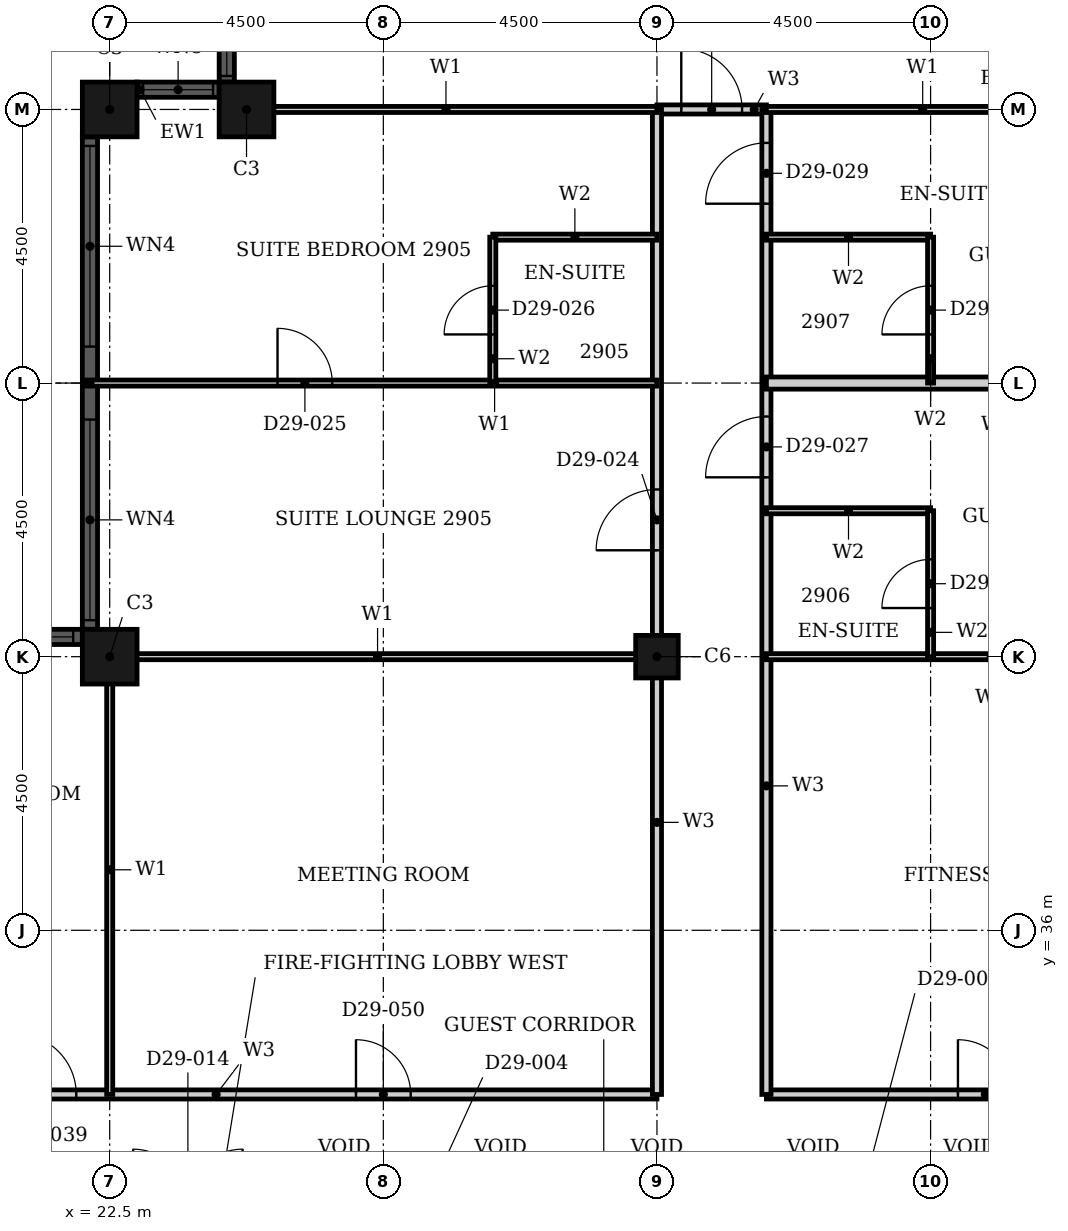
"""IFC4 building model, lengths in metres.
Left out: names, types, materials, properties, quantities, classifications, styles, units other than length and angle.
Written with IfcOpenShell. Run it as: python <this file> out.ifc"""

import sys

from ifc_helpers import new_model, si_unit, direction, frame, frame_2d, origin, origin_2d, place, context, subcontext, project, spatial, rectangle, hollow_rectangle, extrude, element, fill, save


model = new_model("IFC4")
c1 = context("Model", 3, precision=1e-05, world=origin(), true_north=direction((0.0, 1.0)))
c2 = subcontext(c1, "Body", "Model", "MODEL_VIEW")
j1 = project(units=[si_unit("LENGTHUNIT", "METRE"), si_unit("PLANEANGLEUNIT", "RADIAN")], contexts=[c1])
p1 = place(None, origin())
s1 = spatial("IfcSite", under=j1, at=p1, CompositionType="ELEMENT")
p2 = place(p1, origin())
s2 = spatial("IfcBuilding", under=s1, at=p2, CompositionType="ELEMENT")
p3 = place(p2, frame((0.0, 0.0, 118.8)))
s3 = spatial("IfcBuildingStorey", under=s2, at=p3, CompositionType="ELEMENT", Elevation=118.8)
for number, where, z_axis, x_axis in (
    (1, (24.75, 49.5, 0.0), (0.0, 0.0, 1.0), (1.0, 0.0, 0.0)),
    (2, (22.5, 49.5, 0.0), (0.0, 0.0, 1.0), (1.0, 0.0, 0.0)),
    (3, (22.5, 40.5, 0.0), (0.0, 0.0, 1.0), (1.0, 0.0, 0.0)),
):
    element("IfcColumn", number, at=place(p3, frame(where, z_axis=z_axis, x_axis=x_axis)), inside=s3, PredefinedType="COLUMN", context=c2, shape_type="SweptSolid", body=[
        extrude(hollow_rectangle(XDim=0.9, YDim=0.9, WallThickness=0.028, at=origin_2d()), origin(), (0.0, 0.0, 1.0), 3.6),
    ])
p4 = place(p3, frame((31.5, 40.5, 0.0), z_axis=(0.0, 0.0, 1.0), x_axis=(1.0, 0.0, 0.0)))
e4 = element("IfcColumn", 4, at=p4, inside=s3, PredefinedType="COLUMN", context=c2, shape_type="SweptSolid", body=[
    extrude(hollow_rectangle(XDim=0.7, YDim=0.7, WallThickness=0.022, at=origin_2d()), origin(), (0.0, 0.0, 1.0), 3.6),
])
p5 = place(p3, frame((24.425, 51.3, 0.0), z_axis=(0.0, 0.0, 1.0), x_axis=(0.0, -1.0, 0.0)))
e5 = element("IfcWall", 5, at=p5, inside=s3, PredefinedType="SOLIDWALL", context=c2, shape_type="SweptSolid", body=[
    extrude(rectangle(XDim=1.35, YDim=0.25, at=frame_2d((0.675, 0.0))), origin(), (0.0, 0.0, 1.0), 3.6),
])
p6 = place(p5, frame((0.1, 0.0, 0.9)))
e6 = element("IfcOpeningElement", 6, at=p6, cuts=e5, PredefinedType="OPENING", context=c2, shape_type="SweptSolid", body=[
    extrude(rectangle(XDim=1.15, YDim=2.08, at=frame_2d((0.575, 1.04))), frame((0.0, 0.135, 0.0), z_axis=(0.0, -1.0, 0.0), x_axis=(1.0, 0.0, 0.0)), (0.0, 0.0, 1.0), 0.27),
])
p7 = place(p3, frame((24.3, 49.825, 0.0), z_axis=(0.0, 0.0, 1.0), x_axis=(-1.0, 0.0, 0.0)))
e7 = element("IfcWall", 7, at=p7, inside=s3, PredefinedType="SOLIDWALL", context=c2, shape_type="SweptSolid", body=[
    extrude(rectangle(XDim=1.35, YDim=0.25, at=frame_2d((0.675, 0.0))), origin(), (0.0, 0.0, 1.0), 3.6),
])
p8 = place(p7, frame((0.1, 0.0, 0.9)))
e8 = element("IfcOpeningElement", 8, at=p8, cuts=e7, PredefinedType="OPENING", context=c2, shape_type="SweptSolid", body=[
    extrude(rectangle(XDim=1.15, YDim=2.08, at=frame_2d((0.575, 1.04))), frame((0.0, 0.135, 0.0), z_axis=(0.0, -1.0, 0.0), x_axis=(1.0, 0.0, 0.0)), (0.0, 0.0, 1.0), 0.27),
])
p9 = place(p3, frame((22.175, 49.05, 0.0), z_axis=(0.0, 0.0, 1.0), x_axis=(0.0, -1.0, 0.0)))
e9 = element("IfcWall", 9, at=p9, inside=s3, PredefinedType="SOLIDWALL", context=c2, shape_type="SweptSolid", body=[
    extrude(rectangle(XDim=8.1, YDim=0.25, at=frame_2d((4.05, 0.0))), origin(), (0.0, 0.0, 1.0), 3.6),
])
p10 = place(p9, frame((0.15, 0.0, 0.9)))
e10 = element("IfcOpeningElement", 10, at=p10, cuts=e9, PredefinedType="OPENING", context=c2, shape_type="SweptSolid", body=[
    extrude(rectangle(XDim=3.3, YDim=2.08, at=frame_2d((1.65, 1.04))), frame((0.0, 0.135, 0.0), z_axis=(0.0, -1.0, 0.0), x_axis=(1.0, 0.0, 0.0)), (0.0, 0.0, 1.0), 0.27),
])
p11 = place(p9, frame((4.65, 0.0, 0.9)))
e11 = element("IfcOpeningElement", 11, at=p11, cuts=e9, PredefinedType="OPENING", context=c2, shape_type="SweptSolid", body=[
    extrude(rectangle(XDim=3.3, YDim=2.08, at=frame_2d((1.65, 1.04))), frame((0.0, 0.135, 0.0), z_axis=(0.0, -1.0, 0.0), x_axis=(1.0, 0.0, 0.0)), (0.0, 0.0, 1.0), 0.27),
])
p12 = place(p3, frame((22.05, 40.825, 0.0), z_axis=(0.0, 0.0, 1.0), x_axis=(-1.0, 0.0, 0.0)))
e12 = element("IfcWall", 12, at=p12, inside=s3, PredefinedType="SOLIDWALL", context=c2, shape_type="SweptSolid", body=[
    extrude(rectangle(XDim=3.6, YDim=0.25, at=frame_2d((1.8, 0.0))), origin(), (0.0, 0.0, 1.0), 3.6),
])
p13 = place(p12, frame((0.15, 0.0, 0.9)))
e13 = element("IfcOpeningElement", 13, at=p13, cuts=e12, PredefinedType="OPENING", context=c2, shape_type="SweptSolid", body=[
    extrude(rectangle(XDim=3.3, YDim=2.08, at=frame_2d((1.65, 1.04))), frame((0.0, 0.135, 0.0), z_axis=(0.0, -1.0, 0.0), x_axis=(1.0, 0.0, 0.0)), (0.0, 0.0, 1.0), 0.27),
])
p14 = place(p3, frame((33.3, 33.3, 0.0), z_axis=(0.0, 0.0, 1.0), x_axis=(1.0, 0.0, 0.0)))
e14 = element("IfcWall", 14, at=p14, inside=s3, PredefinedType="PARTITIONING", context=c2, shape_type="SweptSolid", body=[
    extrude(rectangle(XDim=11.7, YDim=0.15, at=frame_2d((5.85, 0.0))), origin(), (0.0, 0.0, 1.0), 3.3),
])
p15 = place(p14, frame((10.15, 0.0, 0.0)))
e15 = element("IfcOpeningElement", 15, at=p15, cuts=e14, PredefinedType="OPENING", context=c2, shape_type="SweptSolid", body=[
    extrude(rectangle(XDim=1.0, YDim=2.1, at=frame_2d((0.5, 1.05))), frame((0.0, 0.085, 0.0), z_axis=(0.0, -1.0, 0.0), x_axis=(1.0, 0.0, 0.0)), (0.0, 0.0, 1.0), 0.17),
])
p16 = place(p14, frame((3.15, 0.0, 0.0)))
e16 = element("IfcOpeningElement", 16, at=p16, cuts=e14, PredefinedType="OPENING", context=c2, shape_type="SweptSolid", body=[
    extrude(rectangle(XDim=0.9, YDim=2.1, at=frame_2d((0.45, 1.05))), frame((0.0, 0.085, 0.0), z_axis=(0.0, -1.0, 0.0), x_axis=(1.0, 0.0, 0.0)), (0.0, 0.0, 1.0), 0.17),
])
p17 = place(p3, frame((16.2, 33.3, 0.0), z_axis=(0.0, 0.0, 1.0), x_axis=(1.0, 0.0, 0.0)))
e17 = element("IfcWall", 17, at=p17, inside=s3, PredefinedType="PARTITIONING", context=c2, shape_type="SweptSolid", body=[
    extrude(rectangle(XDim=15.3, YDim=0.15, at=frame_2d((7.65, 0.0))), origin(), (0.0, 0.0, 1.0), 3.3),
])
p18 = place(p17, frame((4.75, 0.0, 0.0)))
e18 = element("IfcOpeningElement", 18, at=p18, cuts=e17, PredefinedType="OPENING", context=c2, shape_type="SweptSolid", body=[
    extrude(rectangle(XDim=1.0, YDim=2.1, at=frame_2d((0.5, 1.05))), frame((0.0, 0.085, 0.0), z_axis=(0.0, -1.0, 0.0), x_axis=(1.0, 0.0, 0.0)), (0.0, 0.0, 1.0), 0.17),
])
p19 = place(p17, frame((0.45, 0.0, 0.0)))
e19 = element("IfcOpeningElement", 19, at=p19, cuts=e17, PredefinedType="OPENING", context=c2, shape_type="SweptSolid", body=[
    extrude(rectangle(XDim=0.9, YDim=2.1, at=frame_2d((0.45, 1.05))), frame((0.0, 0.085, 0.0), z_axis=(0.0, -1.0, 0.0), x_axis=(1.0, 0.0, 0.0)), (0.0, 0.0, 1.0), 0.17),
])
p20 = place(p17, frame((10.35, 0.0, 0.0)))
e20 = element("IfcOpeningElement", 20, at=p20, cuts=e17, PredefinedType="OPENING", context=c2, shape_type="SweptSolid", body=[
    extrude(rectangle(XDim=0.9, YDim=2.1, at=frame_2d((0.45, 1.05))), frame((0.0, 0.085, 0.0), z_axis=(0.0, -1.0, 0.0), x_axis=(1.0, 0.0, 0.0)), (0.0, 0.0, 1.0), 0.17),
])
p21 = place(p3, frame((31.5, 49.5, 0.0), z_axis=(0.0, 0.0, 1.0), x_axis=(1.0, 0.0, 0.0)))
e21 = element("IfcWall", 21, at=p21, inside=s3, PredefinedType="PARTITIONING", context=c2, shape_type="SweptSolid", body=[
    extrude(rectangle(XDim=1.8, YDim=0.15, at=frame_2d((0.9, 0.0))), origin(), (0.0, 0.0, 1.0), 3.3),
])
p22 = place(p21, frame((0.4, 0.0, 0.0)))
e22 = element("IfcOpeningElement", 22, at=p22, cuts=e21, PredefinedType="OPENING", context=c2, shape_type="SweptSolid", body=[
    extrude(rectangle(XDim=1.0, YDim=2.1, at=frame_2d((0.5, 1.05))), frame((0.0, 0.085, 0.0), z_axis=(0.0, -1.0, 0.0), x_axis=(1.0, 0.0, 0.0)), (0.0, 0.0, 1.0), 0.17),
])
p23 = place(p3, frame((31.5, 33.3, 0.0), z_axis=(0.0, 0.0, 1.0), x_axis=(0.0, 1.0, 0.0)))
e23 = element("IfcWall", 23, at=p23, inside=s3, PredefinedType="PARTITIONING", context=c2, shape_type="SweptSolid", body=[
    extrude(rectangle(XDim=16.2, YDim=0.15, at=frame_2d((8.1, 0.0))), origin(), (0.0, 0.0, 1.0), 2.58),
])
p24 = place(p23, frame((8.95, 0.0, 0.0)))
e24 = element("IfcOpeningElement", 24, at=p24, cuts=e23, PredefinedType="OPENING", context=c2, shape_type="SweptSolid", body=[
    extrude(rectangle(XDim=1.0, YDim=2.1, at=frame_2d((0.5, 1.05))), frame((0.0, 0.085, 0.0), z_axis=(0.0, -1.0, 0.0), x_axis=(1.0, 0.0, 0.0)), (0.0, 0.0, 1.0), 0.17),
])
p25 = place(p3, frame((33.3, 33.3, 0.0), z_axis=(0.0, 0.0, 1.0), x_axis=(0.0, 1.0, 0.0)))
e25 = element("IfcWall", 25, at=p25, inside=s3, PredefinedType="PARTITIONING", context=c2, shape_type="SweptSolid", body=[
    extrude(rectangle(XDim=16.2, YDim=0.15, at=frame_2d((8.1, 0.0))), origin(), (0.0, 0.0, 1.0), 3.3),
])
p26 = place(p25, frame((10.15, 0.0, 0.0)))
e26 = element("IfcOpeningElement", 26, at=p26, cuts=e25, PredefinedType="OPENING", context=c2, shape_type="SweptSolid", body=[
    extrude(rectangle(XDim=1.0, YDim=2.1, at=frame_2d((0.5, 1.05))), frame((0.0, 0.085, 0.0), z_axis=(0.0, -1.0, 0.0), x_axis=(1.0, 0.0, 0.0)), (0.0, 0.0, 1.0), 0.17),
])
p27 = place(p25, frame((14.65, 0.0, 0.0)))
e27 = element("IfcOpeningElement", 27, at=p27, cuts=e25, PredefinedType="OPENING", context=c2, shape_type="SweptSolid", body=[
    extrude(rectangle(XDim=1.0, YDim=2.1, at=frame_2d((0.5, 1.05))), frame((0.0, 0.085, 0.0), z_axis=(0.0, -1.0, 0.0), x_axis=(1.0, 0.0, 0.0)), (0.0, 0.0, 1.0), 0.17),
])
p28 = place(p3, frame((33.3, 40.5, 0.0), z_axis=(0.0, 0.0, 1.0), x_axis=(1.0, 0.0, 0.0)))
e28 = element("IfcWall", 28, at=p28, inside=s3, PredefinedType="PARTITIONING", context=c2, shape_type="SweptSolid", body=[
    extrude(rectangle(XDim=7.39, YDim=0.1, at=frame_2d((3.695, 0.0))), origin(), (0.0, 0.0, 1.0), 2.38),
])
p29 = place(p3, frame((22.31, 40.5, 0.0), z_axis=(0.0, 0.0, 1.0), x_axis=(1.0, 0.0, 0.0)))
e29 = element("IfcWall", 29, at=p29, inside=s3, PredefinedType="PARTITIONING", context=c2, shape_type="SweptSolid", body=[
    extrude(rectangle(XDim=9.19, YDim=0.1, at=frame_2d((4.595, 0.0))), origin(), (0.0, 0.0, 1.0), 2.38),
])
p30 = place(p3, frame((22.11, 45.0, 0.0), z_axis=(0.0, 0.0, 1.0), x_axis=(1.0, 0.0, 0.0)))
e30 = element("IfcWall", 30, at=p30, inside=s3, PredefinedType="PARTITIONING", context=c2, shape_type="SweptSolid", body=[
    extrude(rectangle(XDim=9.39, YDim=0.1, at=frame_2d((4.695, 0.0))), origin(), (0.0, 0.0, 1.0), 3.3),
])
p31 = place(p30, frame((3.15, 0.0, 0.0)))
e31 = element("IfcOpeningElement", 31, at=p31, cuts=e30, PredefinedType="OPENING", context=c2, shape_type="SweptSolid", body=[
    extrude(rectangle(XDim=0.9, YDim=2.1, at=frame_2d((0.45, 1.05))), frame((0.0, 0.06, 0.0), z_axis=(0.0, -1.0, 0.0), x_axis=(1.0, 0.0, 0.0)), (0.0, 0.0, 1.0), 0.12),
])
p32 = place(p3, frame((33.3, 49.5, 0.0), z_axis=(0.0, 0.0, 1.0), x_axis=(1.0, 0.0, 0.0)))
e32 = element("IfcWall", 32, at=p32, inside=s3, PredefinedType="PARTITIONING", context=c2, shape_type="SweptSolid", body=[
    extrude(rectangle(XDim=5.14, YDim=0.1, at=frame_2d((2.57, 0.0))), origin(), (0.0, 0.0, 1.0), 3.3),
])
p33 = place(p3, frame((24.56, 49.5, 0.0), z_axis=(0.0, 0.0, 1.0), x_axis=(1.0, 0.0, 0.0)))
e33 = element("IfcWall", 33, at=p33, inside=s3, PredefinedType="PARTITIONING", context=c2, shape_type="SweptSolid", body=[
    extrude(rectangle(XDim=6.94, YDim=0.1, at=frame_2d((3.47, 0.0))), origin(), (0.0, 0.0, 1.0), 3.3),
])
p34 = place(p3, frame((22.5, 33.3, 0.0), z_axis=(0.0, 0.0, 1.0), x_axis=(0.0, 1.0, 0.0)))
e34 = element("IfcWall", 34, at=p34, inside=s3, PredefinedType="PARTITIONING", context=c2, shape_type="SweptSolid", body=[
    extrude(rectangle(XDim=7.39, YDim=0.1, at=frame_2d((3.695, 0.0))), origin(), (0.0, 0.0, 1.0), 3.3),
])
p35 = place(p3, frame((33.3, 45.0, 0.0), z_axis=(0.0, 0.0, 1.0), x_axis=(1.0, 0.0, 0.0)))
e35 = element("IfcWall", 35, at=p35, inside=s3, PredefinedType="PARTITIONING", context=c2, shape_type="SweptSolid", body=[
    extrude(rectangle(XDim=7.59, YDim=0.2, at=frame_2d((3.795, 0.0))), origin(), (0.0, 0.0, 1.0), 3.3),
])
for number, where, z_axis, x_axis in (
    (36, (33.3, 42.9, 0.0), (0.0, 0.0, 1.0), (1.0, 0.0, 0.0)),
    (37, (33.3, 47.4, 0.0), (0.0, 0.0, 1.0), (1.0, 0.0, 0.0)),
    (38, (28.8, 47.4, 0.0), (0.0, 0.0, 1.0), (1.0, 0.0, 0.0)),
):
    element("IfcWall", number, at=place(p3, frame(where, z_axis=z_axis, x_axis=x_axis)), inside=s3, PredefinedType="PARTITIONING", context=c2, shape_type="SweptSolid", body=[
        extrude(rectangle(XDim=2.7, YDim=0.1, at=frame_2d((1.35, 0.0))), origin(), (0.0, 0.0, 1.0), 3.3),
    ])
p36 = place(p3, frame((28.8, 45.0, 0.0), z_axis=(0.0, 0.0, 1.0), x_axis=(0.0, 1.0, 0.0)))
e39 = element("IfcWall", 39, at=p36, inside=s3, PredefinedType="PARTITIONING", context=c2, shape_type="SweptSolid", body=[
    extrude(rectangle(XDim=2.4, YDim=0.1, at=frame_2d((1.2, 0.0))), origin(), (0.0, 0.0, 1.0), 3.3),
])
p37 = place(p36, frame((0.8, 0.0, 0.0)))
e40 = element("IfcOpeningElement", 40, at=p37, cuts=e39, PredefinedType="OPENING", context=c2, shape_type="SweptSolid", body=[
    extrude(rectangle(XDim=0.8, YDim=2.1, at=frame_2d((0.4, 1.05))), frame((0.0, 0.06, 0.0), z_axis=(0.0, -1.0, 0.0), x_axis=(1.0, 0.0, 0.0)), (0.0, 0.0, 1.0), 0.12),
])
p38 = place(p3, frame((36.0, 40.5, 0.0), z_axis=(0.0, 0.0, 1.0), x_axis=(0.0, 1.0, 0.0)))
e41 = element("IfcWall", 41, at=p38, inside=s3, PredefinedType="PARTITIONING", context=c2, shape_type="SweptSolid", body=[
    extrude(rectangle(XDim=2.4, YDim=0.1, at=frame_2d((1.2, 0.0))), origin(), (0.0, 0.0, 1.0), 2.58),
])
p39 = place(p38, frame((0.8, 0.0, 0.0)))
e42 = element("IfcOpeningElement", 42, at=p39, cuts=e41, PredefinedType="OPENING", context=c2, shape_type="SweptSolid", body=[
    extrude(rectangle(XDim=0.8, YDim=2.1, at=frame_2d((0.4, 1.05))), frame((0.0, 0.06, 0.0), z_axis=(0.0, -1.0, 0.0), x_axis=(1.0, 0.0, 0.0)), (0.0, 0.0, 1.0), 0.12),
])
p40 = place(p3, frame((36.0, 45.0, 0.0), z_axis=(0.0, 0.0, 1.0), x_axis=(0.0, 1.0, 0.0)))
e43 = element("IfcWall", 43, at=p40, inside=s3, PredefinedType="PARTITIONING", context=c2, shape_type="SweptSolid", body=[
    extrude(rectangle(XDim=2.4, YDim=0.1, at=frame_2d((1.2, 0.0))), origin(), (0.0, 0.0, 1.0), 2.58),
])
p41 = place(p40, frame((0.8, 0.0, 0.0)))
e44 = element("IfcOpeningElement", 44, at=p41, cuts=e43, PredefinedType="OPENING", context=c2, shape_type="SweptSolid", body=[
    extrude(rectangle(XDim=0.8, YDim=2.1, at=frame_2d((0.4, 1.05))), frame((0.0, 0.06, 0.0), z_axis=(0.0, -1.0, 0.0), x_axis=(1.0, 0.0, 0.0)), (0.0, 0.0, 1.0), 0.12),
])
p42 = place(p6, origin())
e45 = element("IfcWindow", 45, at=p42, inside=s3, PartitioningType="SINGLE_PANEL", PredefinedType="WINDOW", context=c2, shape_type="SweptSolid", body=[
    extrude(rectangle(XDim=1.15, YDim=2.08, at=frame_2d((0.575, 1.04))), frame((0.0, 0.03, 0.0), z_axis=(0.0, -1.0, 0.0), x_axis=(1.0, 0.0, 0.0)), (0.0, 0.0, 1.0), 0.06),
])
fill(e6, e45)
p43 = place(p8, origin())
e46 = element("IfcWindow", 46, at=p43, inside=s3, PartitioningType="SINGLE_PANEL", PredefinedType="WINDOW", context=c2, shape_type="SweptSolid", body=[
    extrude(rectangle(XDim=1.15, YDim=2.08, at=frame_2d((0.575, 1.04))), frame((0.0, 0.03, 0.0), z_axis=(0.0, -1.0, 0.0), x_axis=(1.0, 0.0, 0.0)), (0.0, 0.0, 1.0), 0.06),
])
fill(e8, e46)
p44 = place(p10, origin())
e47 = element("IfcWindow", 47, at=p44, inside=s3, PartitioningType="SINGLE_PANEL", PredefinedType="WINDOW", context=c2, shape_type="SweptSolid", body=[
    extrude(rectangle(XDim=3.3, YDim=2.08, at=frame_2d((1.65, 1.04))), frame((0.0, 0.03, 0.0), z_axis=(0.0, -1.0, 0.0), x_axis=(1.0, 0.0, 0.0)), (0.0, 0.0, 1.0), 0.06),
])
fill(e10, e47)
p45 = place(p11, origin())
e48 = element("IfcWindow", 48, at=p45, inside=s3, PartitioningType="SINGLE_PANEL", PredefinedType="WINDOW", context=c2, shape_type="SweptSolid", body=[
    extrude(rectangle(XDim=3.3, YDim=2.08, at=frame_2d((1.65, 1.04))), frame((0.0, 0.03, 0.0), z_axis=(0.0, -1.0, 0.0), x_axis=(1.0, 0.0, 0.0)), (0.0, 0.0, 1.0), 0.06),
])
fill(e11, e48)
p46 = place(p13, origin())
e49 = element("IfcWindow", 49, at=p46, inside=s3, PartitioningType="SINGLE_PANEL", PredefinedType="WINDOW", context=c2, shape_type="SweptSolid", body=[
    extrude(rectangle(XDim=3.3, YDim=2.08, at=frame_2d((1.65, 1.04))), frame((0.0, 0.03, 0.0), z_axis=(0.0, -1.0, 0.0), x_axis=(1.0, 0.0, 0.0)), (0.0, 0.0, 1.0), 0.06),
])
fill(e13, e49)
p47 = place(p24, origin())
e50 = element("IfcDoor", 50, at=p47, inside=s3, OperationType="SINGLE_SWING_LEFT", PredefinedType="DOOR", context=c2, shape_type="SweptSolid", body=[
    extrude(rectangle(XDim=1.0, YDim=2.1, at=frame_2d((0.5, 1.05))), frame((0.0, 0.025, 0.0), z_axis=(0.0, -1.0, 0.0), x_axis=(1.0, 0.0, 0.0)), (0.0, 0.0, 1.0), 0.05),
])
fill(e24, e50)
p48 = place(p31, origin())
e51 = element("IfcDoor", 51, at=p48, inside=s3, OperationType="SINGLE_SWING_LEFT", PredefinedType="DOOR", context=c2, shape_type="SweptSolid", body=[
    extrude(rectangle(XDim=0.9, YDim=2.1, at=frame_2d((0.45, 1.05))), frame((0.0, 0.025, 0.0), z_axis=(0.0, -1.0, 0.0), x_axis=(1.0, 0.0, 0.0)), (0.0, 0.0, 1.0), 0.05),
])
fill(e31, e51)
p49 = place(p37, origin())
e52 = element("IfcDoor", 52, at=p49, inside=s3, OperationType="SINGLE_SWING_LEFT", PredefinedType="DOOR", context=c2, shape_type="SweptSolid", body=[
    extrude(rectangle(XDim=0.8, YDim=2.1, at=frame_2d((0.4, 1.05))), frame((0.0, 0.025, 0.0), z_axis=(0.0, -1.0, 0.0), x_axis=(1.0, 0.0, 0.0)), (0.0, 0.0, 1.0), 0.05),
])
fill(e40, e52)
p50 = place(p26, origin())
e53 = element("IfcDoor", 53, at=p50, inside=s3, OperationType="SINGLE_SWING_RIGHT", PredefinedType="DOOR", context=c2, shape_type="SweptSolid", body=[
    extrude(rectangle(XDim=1.0, YDim=2.1, at=frame_2d((0.5, 1.05))), frame((0.0, 0.025, 0.0), z_axis=(0.0, -1.0, 0.0), x_axis=(1.0, 0.0, 0.0)), (0.0, 0.0, 1.0), 0.05),
])
fill(e26, e53)
p51 = place(p39, origin())
e54 = element("IfcDoor", 54, at=p51, inside=s3, OperationType="SINGLE_SWING_LEFT", PredefinedType="DOOR", context=c2, shape_type="SweptSolid", body=[
    extrude(rectangle(XDim=0.8, YDim=2.1, at=frame_2d((0.4, 1.05))), frame((0.0, 0.025, 0.0), z_axis=(0.0, -1.0, 0.0), x_axis=(1.0, 0.0, 0.0)), (0.0, 0.0, 1.0), 0.05),
])
fill(e42, e54)
p52 = place(p27, origin())
e55 = element("IfcDoor", 55, at=p52, inside=s3, OperationType="SINGLE_SWING_RIGHT", PredefinedType="DOOR", context=c2, shape_type="SweptSolid", body=[
    extrude(rectangle(XDim=1.0, YDim=2.1, at=frame_2d((0.5, 1.05))), frame((0.0, 0.025, 0.0), z_axis=(0.0, -1.0, 0.0), x_axis=(1.0, 0.0, 0.0)), (0.0, 0.0, 1.0), 0.05),
])
fill(e27, e55)
p53 = place(p41, origin())
e56 = element("IfcDoor", 56, at=p53, inside=s3, OperationType="SINGLE_SWING_RIGHT", PredefinedType="DOOR", context=c2, shape_type="SweptSolid", body=[
    extrude(rectangle(XDim=0.8, YDim=2.1, at=frame_2d((0.4, 1.05))), frame((0.0, 0.025, 0.0), z_axis=(0.0, -1.0, 0.0), x_axis=(1.0, 0.0, 0.0)), (0.0, 0.0, 1.0), 0.05),
])
fill(e44, e56)
p54 = place(p22, origin())
e57 = element("IfcDoor", 57, at=p54, inside=s3, OperationType="SINGLE_SWING_LEFT", PredefinedType="DOOR", context=c2, shape_type="SweptSolid", body=[
    extrude(rectangle(XDim=1.0, YDim=2.1, at=frame_2d((0.5, 1.05))), frame((0.0, 0.025, 0.0), z_axis=(0.0, -1.0, 0.0), x_axis=(1.0, 0.0, 0.0)), (0.0, 0.0, 1.0), 0.05),
])
fill(e22, e57)
p55 = place(p18, origin())
e58 = element("IfcDoor", 58, at=p55, inside=s3, OperationType="SINGLE_SWING_RIGHT", PredefinedType="DOOR", context=c2, shape_type="SweptSolid", body=[
    extrude(rectangle(XDim=1.0, YDim=2.1, at=frame_2d((0.5, 1.05))), frame((0.0, 0.025, 0.0), z_axis=(0.0, -1.0, 0.0), x_axis=(1.0, 0.0, 0.0)), (0.0, 0.0, 1.0), 0.05),
])
fill(e18, e58)
p56 = place(p20, origin())
e59 = element("IfcDoor", 59, at=p56, inside=s3, OperationType="SINGLE_SWING_LEFT", PredefinedType="DOOR", context=c2, shape_type="SweptSolid", body=[
    extrude(rectangle(XDim=0.9, YDim=2.1, at=frame_2d((0.45, 1.05))), frame((0.0, 0.025, 0.0), z_axis=(0.0, -1.0, 0.0), x_axis=(1.0, 0.0, 0.0)), (0.0, 0.0, 1.0), 0.05),
])
fill(e20, e59)
p57 = place(p16, origin())
e60 = element("IfcDoor", 60, at=p57, inside=s3, OperationType="SINGLE_SWING_RIGHT", PredefinedType="DOOR", context=c2, shape_type="SweptSolid", body=[
    extrude(rectangle(XDim=0.9, YDim=2.1, at=frame_2d((0.45, 1.05))), frame((0.0, 0.025, 0.0), z_axis=(0.0, -1.0, 0.0), x_axis=(1.0, 0.0, 0.0)), (0.0, 0.0, 1.0), 0.05),
])
fill(e16, e60)
save(model, sys.argv[1])
